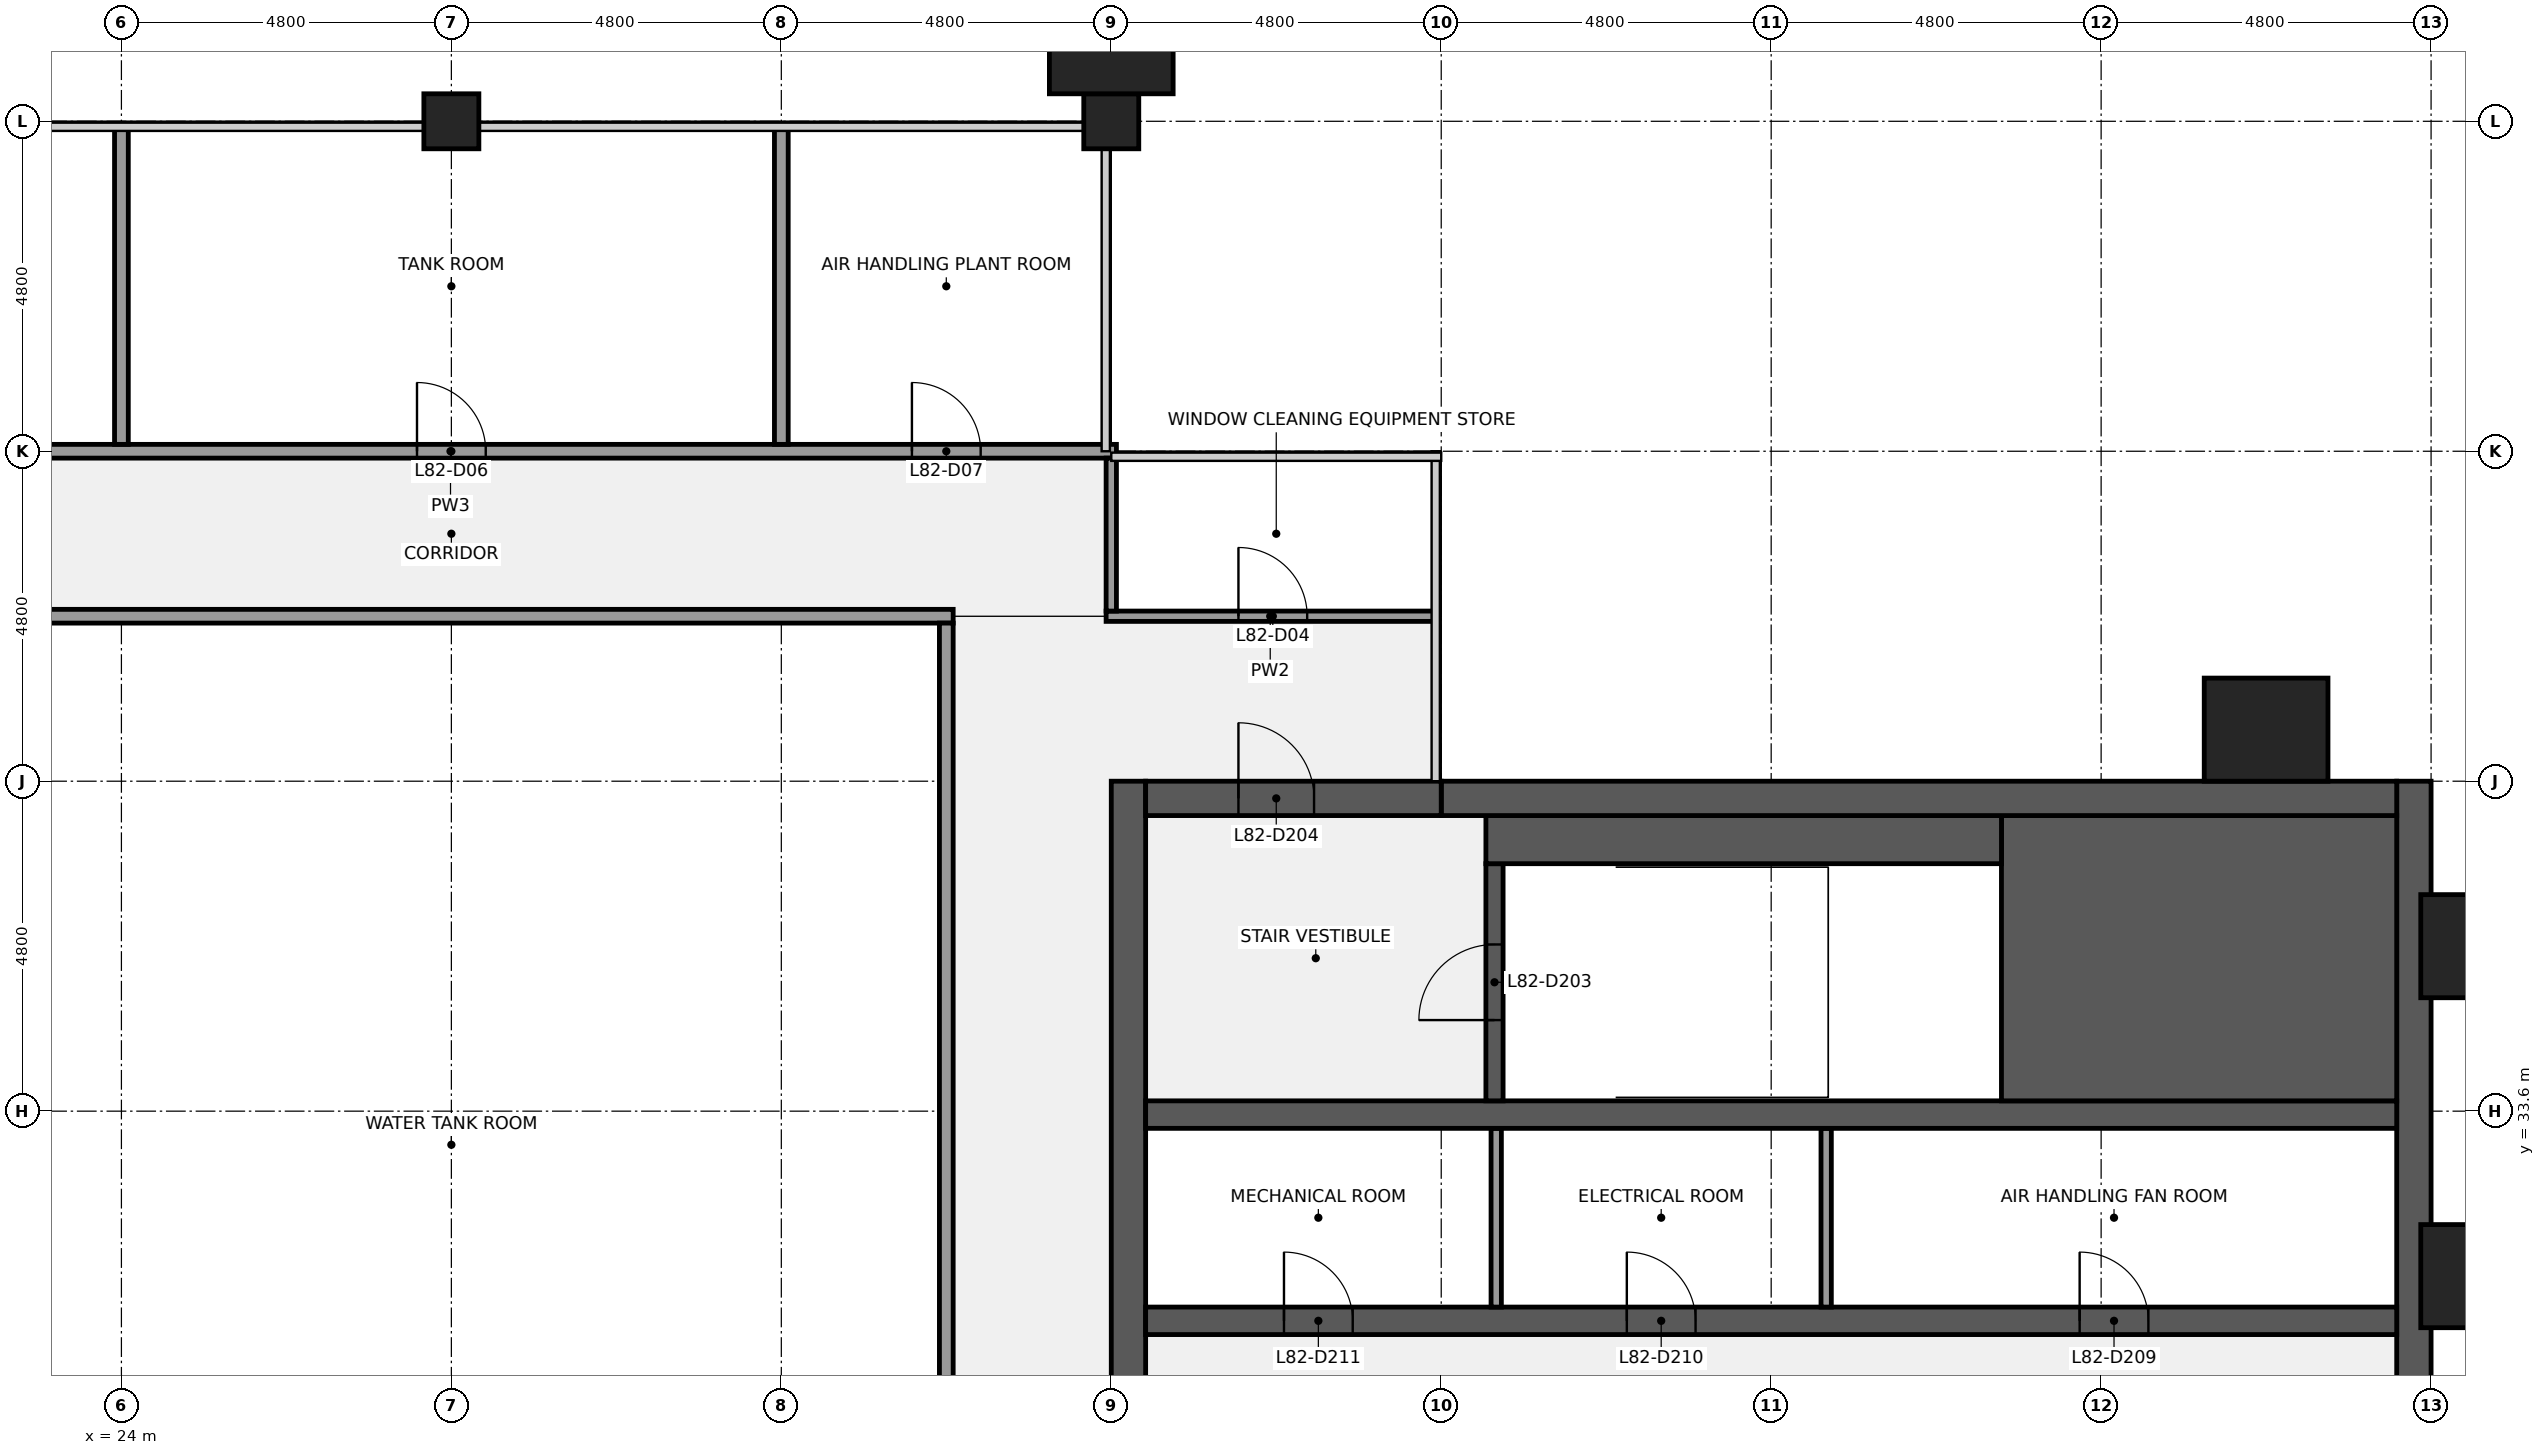
"""IFC4 building model, lengths in metres.
Left out: names, types, materials, properties, quantities, classifications, styles, units other than length and angle.
Written with IfcOpenShell. Run it as: python <this file> out.ifc"""

import sys

from ifc_helpers import new_model, si_unit, direction, frame, frame_2d, origin, origin_2d, place, context, subcontext, project, spatial, rectangle, extrude, element, fill, save


model = new_model("IFC4")
c1 = context("Model", 3, precision=1e-05, world=origin(), true_north=direction((0.0, 1.0)))
c2 = subcontext(c1, "Body", "Model", "MODEL_VIEW")
j1 = project(units=[si_unit("LENGTHUNIT", "METRE"), si_unit("PLANEANGLEUNIT", "RADIAN")], contexts=[c1])
p1 = place(None, origin())
s1 = spatial("IfcSite", under=j1, at=p1, CompositionType="ELEMENT")
p2 = place(p1, origin())
s2 = spatial("IfcBuilding", under=s1, at=p2, CompositionType="ELEMENT")
p3 = place(p2, frame((0.0, 0.0, 366.3)))
s3 = spatial("IfcBuildingStorey", under=s2, at=p3, CompositionType="ELEMENT", Elevation=366.3)
for number, where, z_axis, x_axis in (
    (1, (28.8, 48.0, 0.0), (0.0, 0.0, 1.0), (1.0, 0.0, 0.0)),
    (2, (38.4, 48.0, 0.0), (0.0, 0.0, 1.0), (1.0, 0.0, 0.0)),
):
    element("IfcColumn", number, at=place(p3, frame(where, z_axis=z_axis, x_axis=x_axis)), inside=s3, PredefinedType="COLUMN", context=c2, shape_type="SweptSolid", body=[
        extrude(rectangle(XDim=0.8, YDim=0.8, at=origin_2d()), origin(), (0.0, 0.0, 1.0), 4.0),
    ])
p4 = place(p3, frame((57.35, 38.4, 0.0), z_axis=(0.0, 0.0, 1.0), x_axis=(0.0, -1.0, 0.0)))
e3 = element("IfcWall", 3, at=p4, inside=s3, PredefinedType="SHEAR", context=c2, shape_type="SweptSolid", body=[
    extrude(rectangle(XDim=28.8, YDim=0.5, at=frame_2d((14.4, 0.0))), origin(), (0.0, 0.0, 1.0), 3.75),
])
p5 = place(p3, frame((38.65, 9.6, 0.0), z_axis=(0.0, 0.0, 1.0), x_axis=(0.0, 1.0, 0.0)))
e4 = element("IfcWall", 4, at=p5, inside=s3, PredefinedType="SHEAR", context=c2, shape_type="SweptSolid", body=[
    extrude(rectangle(XDim=28.8, YDim=0.5, at=frame_2d((14.4, 0.0))), origin(), (0.0, 0.0, 1.0), 3.75),
])
p6 = place(p5, frame((8.7, 0.0, 0.0)))
e5 = element("IfcOpeningElement", 5, at=p6, cuts=e4, PredefinedType="OPENING", context=c2, shape_type="SweptSolid", body=[
    extrude(rectangle(XDim=1.8, YDim=2.1, at=frame_2d((0.9, 1.05))), frame((0.0, 0.26, 0.0), z_axis=(0.0, -1.0, 0.0), x_axis=(1.0, 0.0, 0.0)), (0.0, 0.0, 1.0), 0.52),
])
p7 = place(p5, frame((18.3, 0.0, 0.0)))
e6 = element("IfcOpeningElement", 6, at=p7, cuts=e4, PredefinedType="OPENING", context=c2, shape_type="SweptSolid", body=[
    extrude(rectangle(XDim=1.8, YDim=2.1, at=frame_2d((0.9, 1.05))), frame((0.0, 0.26, 0.0), z_axis=(0.0, -1.0, 0.0), x_axis=(1.0, 0.0, 0.0)), (0.0, 0.0, 1.0), 0.52),
])
p8 = place(p3, frame((38.9, 30.55, 0.0), z_axis=(0.0, 0.0, 1.0), x_axis=(1.0, 0.0, 0.0)))
e7 = element("IfcWall", 7, at=p8, inside=s3, PredefinedType="SHEAR", context=c2, shape_type="SweptSolid", body=[
    extrude(rectangle(XDim=18.2, YDim=0.4, at=frame_2d((9.1, 0.0))), origin(), (0.0, 0.0, 1.0), 3.75),
])
p9 = place(p8, frame((13.587, 0.0, 0.0)))
e8 = element("IfcOpeningElement", 8, at=p9, cuts=e7, PredefinedType="OPENING", context=c2, shape_type="SweptSolid", body=[
    extrude(rectangle(XDim=1.0, YDim=2.1, at=frame_2d((0.5, 1.05))), frame((0.0, 0.21, 0.0), z_axis=(0.0, -1.0, 0.0), x_axis=(1.0, 0.0, 0.0)), (0.0, 0.0, 1.0), 0.42),
])
p10 = place(p8, frame((7.0, 0.0, 0.0)))
e9 = element("IfcOpeningElement", 9, at=p10, cuts=e7, PredefinedType="OPENING", context=c2, shape_type="SweptSolid", body=[
    extrude(rectangle(XDim=1.0, YDim=2.1, at=frame_2d((0.5, 1.05))), frame((0.0, 0.21, 0.0), z_axis=(0.0, -1.0, 0.0), x_axis=(1.0, 0.0, 0.0)), (0.0, 0.0, 1.0), 0.42),
])
p11 = place(p8, frame((2.012, 0.0, 0.0)))
e10 = element("IfcOpeningElement", 10, at=p11, cuts=e7, PredefinedType="OPENING", context=c2, shape_type="SweptSolid", body=[
    extrude(rectangle(XDim=1.0, YDim=2.1, at=frame_2d((0.5, 1.05))), frame((0.0, 0.21, 0.0), z_axis=(0.0, -1.0, 0.0), x_axis=(1.0, 0.0, 0.0)), (0.0, 0.0, 1.0), 0.42),
])
for number, where, z_axis, x_axis in (
    (11, (48.8, 30.75, 0.0), (0.0, 0.0, 1.0), (0.0, 1.0, 0.0)),
    (12, (44.0, 30.75, 0.0), (0.0, 0.0, 1.0), (0.0, 1.0, 0.0)),
):
    element("IfcWall", number, at=place(p3, frame(where, z_axis=z_axis, x_axis=x_axis)), inside=s3, PredefinedType="PARTITIONING", context=c2, shape_type="SweptSolid", body=[
        extrude(rectangle(XDim=2.6, YDim=0.15, at=frame_2d((1.3, 0.0))), origin(), (0.0, 0.0, 1.0), 3.75),
    ])
p12 = place(p3, frame((38.9, 33.55, 0.0), z_axis=(0.0, 0.0, 1.0), x_axis=(1.0, 0.0, 0.0)))
e13 = element("IfcWall", 13, at=p12, inside=s3, PredefinedType="SHEAR", context=c2, shape_type="SweptSolid", body=[
    extrude(rectangle(XDim=18.2, YDim=0.4, at=frame_2d((9.1, 0.0))), origin(), (0.0, 0.0, 1.0), 3.75),
])
p13 = place(p3, frame((51.35, 35.825, 0.0), z_axis=(0.0, 0.0, 1.0), x_axis=(1.0, 0.0, 0.0)))
e14 = element("IfcWall", 14, at=p13, inside=s3, PredefinedType="SHEAR", context=c2, shape_type="SweptSolid", body=[
    extrude(rectangle(XDim=5.75, YDim=4.15, at=frame_2d((2.875, 0.0))), origin(), (0.0, 0.0, 1.0), 3.75),
])
p14 = place(p3, frame((43.975, 33.75, 0.0), z_axis=(0.0, 0.0, 1.0), x_axis=(0.0, 1.0, 0.0)))
e15 = element("IfcWall", 15, at=p14, inside=s3, PredefinedType="SHEAR", context=c2, shape_type="SweptSolid", body=[
    extrude(rectangle(XDim=3.45, YDim=0.25, at=frame_2d((1.725, 0.0))), origin(), (0.0, 0.0, 1.0), 3.75),
])
p15 = place(p14, frame((1.175, 0.0, 0.0)))
e16 = element("IfcOpeningElement", 16, at=p15, cuts=e15, PredefinedType="OPENING", context=c2, shape_type="SweptSolid", body=[
    extrude(rectangle(XDim=1.1, YDim=2.1, at=frame_2d((0.55, 1.05))), frame((0.0, 0.135, 0.0), z_axis=(0.0, -1.0, 0.0), x_axis=(1.0, 0.0, 0.0)), (0.0, 0.0, 1.0), 0.27),
])
p16 = place(p3, frame((43.85, 37.55, 0.0), z_axis=(0.0, 0.0, 1.0), x_axis=(1.0, 0.0, 0.0)))
e17 = element("IfcWall", 17, at=p16, inside=s3, PredefinedType="SHEAR", context=c2, shape_type="SweptSolid", body=[
    extrude(rectangle(XDim=7.5, YDim=0.7, at=frame_2d((3.75, 0.0))), origin(), (0.0, 0.0, 1.0), 3.75),
])
p17 = place(p3, frame((43.2, 38.15, 0.0), z_axis=(0.0, 0.0, 1.0), x_axis=(1.0, 0.0, 0.0)))
e18 = element("IfcWall", 18, at=p17, inside=s3, PredefinedType="SHEAR", context=c2, shape_type="SweptSolid", body=[
    extrude(rectangle(XDim=13.9, YDim=0.5, at=frame_2d((6.95, 0.0))), origin(), (0.0, 0.0, 1.0), 3.75),
])
p18 = place(p3, frame((38.9, 38.15, 0.0), z_axis=(0.0, 0.0, 1.0), x_axis=(1.0, 0.0, 0.0)))
e19 = element("IfcWall", 19, at=p18, inside=s3, PredefinedType="SHEAR", context=c2, shape_type="SweptSolid", body=[
    extrude(rectangle(XDim=4.3, YDim=0.5, at=frame_2d((2.15, 0.0))), origin(), (0.0, 0.0, 1.0), 3.75),
])
p19 = place(p18, frame((1.35, 0.0, 0.0)))
e20 = element("IfcOpeningElement", 20, at=p19, cuts=e19, PredefinedType="OPENING", context=c2, shape_type="SweptSolid", body=[
    extrude(rectangle(XDim=1.1, YDim=2.1, at=frame_2d((0.55, 1.05))), frame((0.0, 0.26, 0.0), z_axis=(0.0, -1.0, 0.0), x_axis=(1.0, 0.0, 0.0)), (0.0, 0.0, 1.0), 0.52),
])
p20 = place(p3, frame((38.325, 40.8, 0.0), z_axis=(0.0, 0.0, 1.0), x_axis=(1.0, 0.0, 0.0)))
e21 = element("IfcWall", 21, at=p20, inside=s3, PredefinedType="PARTITIONING", context=c2, shape_type="SweptSolid", body=[
    extrude(rectangle(XDim=4.775, YDim=0.15, at=frame_2d((2.388, 0.0))), origin(), (0.0, 0.0, 1.0), 2.759),
])
p21 = place(p20, frame((1.925, 0.0, 0.0)))
e22 = element("IfcOpeningElement", 22, at=p21, cuts=e21, PredefinedType="OPENING", context=c2, shape_type="SweptSolid", body=[
    extrude(rectangle(XDim=1.0, YDim=2.1, at=frame_2d((0.5, 1.05))), frame((0.0, 0.085, 0.0), z_axis=(0.0, -1.0, 0.0), x_axis=(1.0, 0.0, 0.0)), (0.0, 0.0, 1.0), 0.17),
])
p22 = place(p3, frame((21.5, 40.8, 0.0), z_axis=(0.0, 0.0, 1.0), x_axis=(1.0, 0.0, 0.0)))
e23 = element("IfcWall", 23, at=p22, inside=s3, PredefinedType="PARTITIONING", context=c2, shape_type="SweptSolid", body=[
    extrude(rectangle(XDim=14.6, YDim=0.2, at=frame_2d((7.3, 0.0))), origin(), (0.0, 0.0, 1.0), 2.759),
])
p23 = place(p3, frame((19.1, 43.2, 0.0), z_axis=(0.0, 0.0, 1.0), x_axis=(1.0, 0.0, 0.0)))
e24 = element("IfcWall", 24, at=p23, inside=s3, PredefinedType="PARTITIONING", context=c2, shape_type="SweptSolid", body=[
    extrude(rectangle(XDim=19.375, YDim=0.2, at=frame_2d((9.688, 0.0))), origin(), (0.0, 0.0, 1.0), 2.759),
])
p24 = place(p23, frame((2.0, 0.0, 0.0)))
e25 = element("IfcOpeningElement", 25, at=p24, cuts=e24, PredefinedType="OPENING", context=c2, shape_type="SweptSolid", body=[
    extrude(rectangle(XDim=1.0, YDim=2.1, at=frame_2d((0.5, 1.05))), frame((0.0, 0.11, 0.0), z_axis=(0.0, -1.0, 0.0), x_axis=(1.0, 0.0, 0.0)), (0.0, 0.0, 1.0), 0.22),
])
p25 = place(p23, frame((9.2, 0.0, 0.0)))
e26 = element("IfcOpeningElement", 26, at=p25, cuts=e24, PredefinedType="OPENING", context=c2, shape_type="SweptSolid", body=[
    extrude(rectangle(XDim=1.0, YDim=2.1, at=frame_2d((0.5, 1.05))), frame((0.0, 0.11, 0.0), z_axis=(0.0, -1.0, 0.0), x_axis=(1.0, 0.0, 0.0)), (0.0, 0.0, 1.0), 0.22),
])
p26 = place(p23, frame((16.4, 0.0, 0.0)))
e27 = element("IfcOpeningElement", 27, at=p26, cuts=e24, PredefinedType="OPENING", context=c2, shape_type="SweptSolid", body=[
    extrude(rectangle(XDim=1.0, YDim=2.1, at=frame_2d((0.5, 1.05))), frame((0.0, 0.11, 0.0), z_axis=(0.0, -1.0, 0.0), x_axis=(1.0, 0.0, 0.0)), (0.0, 0.0, 1.0), 0.22),
])
for number, where, z_axis, x_axis in (
    (28, (24.0, 43.3, 0.0), (0.0, 0.0, 1.0), (0.0, 1.0, 0.0)),
    (29, (33.6, 43.3, 0.0), (0.0, 0.0, 1.0), (0.0, 1.0, 0.0)),
):
    element("IfcWall", number, at=place(p3, frame(where, z_axis=z_axis, x_axis=x_axis)), inside=s3, PredefinedType="PARTITIONING", context=c2, shape_type="SweptSolid", body=[
        extrude(rectangle(XDim=4.6, YDim=0.2, at=frame_2d((2.3, 0.0))), origin(), (0.0, 0.0, 1.0), 2.759),
    ])
p27 = place(p3, frame((36.0, 25.522, 0.0), z_axis=(0.0, 0.0, 1.0), x_axis=(0.0, 1.0, 0.0)))
e30 = element("IfcWall", 30, at=p27, inside=s3, PredefinedType="PARTITIONING", context=c2, shape_type="SweptSolid", body=[
    extrude(rectangle(XDim=15.178, YDim=0.2, at=frame_2d((7.589, 0.0))), origin(), (0.0, 0.0, 1.0), 2.759),
])
p28 = place(p3, frame((38.4, 40.875, 0.0), z_axis=(0.0, 0.0, 1.0), x_axis=(0.0, 1.0, 0.0)))
e31 = element("IfcWall", 31, at=p28, inside=s3, PredefinedType="PARTITIONING", context=c2, shape_type="SweptSolid", body=[
    extrude(rectangle(XDim=2.225, YDim=0.15, at=frame_2d((1.113, 0.0))), origin(), (0.0, 0.0, 1.0), 2.759),
])
for number, where, z_axis, x_axis in (
    (32, (58.35, 31.2, 0.0), (0.0, 0.0, 1.0), (0.0, 1.0, 0.0)),
    (33, (58.35, 36.0, 0.0), (0.0, 0.0, 1.0), (0.0, 1.0, 0.0)),
    (34, (55.2, 39.15, 0.0), (0.0, 0.0, 1.0), (1.0, 0.0, 0.0)),
):
    element("IfcColumn", number, at=place(p3, frame(where, z_axis=z_axis, x_axis=x_axis)), inside=s3, PredefinedType="PILASTER", context=c2, shape_type="SweptSolid", body=[
        extrude(rectangle(XDim=1.8, YDim=1.5, at=origin_2d()), origin(), (0.0, 0.0, 1.0), 4.0),
    ])
p29 = place(p3, frame((38.4, 48.95, 0.0), z_axis=(0.0, 0.0, 1.0), x_axis=(1.0, 0.0, 0.0)))
e35 = element("IfcColumn", 35, at=p29, inside=s3, PredefinedType="PILASTER", context=c2, shape_type="SweptSolid", body=[
    extrude(rectangle(XDim=1.8, YDim=1.1, at=origin_2d()), origin(), (0.0, 0.0, 1.0), 4.0),
])
p30 = place(p15, origin())
e36 = element("IfcDoor", 36, at=p30, inside=s3, OperationType="SINGLE_SWING_LEFT", PredefinedType="DOOR", context=c2, shape_type="SweptSolid", body=[
    extrude(rectangle(XDim=1.1, YDim=2.1, at=frame_2d((0.55, 1.05))), frame((0.0, 0.025, 0.0), z_axis=(0.0, -1.0, 0.0), x_axis=(1.0, 0.0, 0.0)), (0.0, 0.0, 1.0), 0.05),
])
fill(e16, e36)
p31 = place(p19, origin())
e37 = element("IfcDoor", 37, at=p31, inside=s3, OperationType="SINGLE_SWING_LEFT", PredefinedType="DOOR", context=c2, shape_type="SweptSolid", body=[
    extrude(rectangle(XDim=1.1, YDim=2.1, at=frame_2d((0.55, 1.05))), frame((0.0, 0.025, 0.0), z_axis=(0.0, -1.0, 0.0), x_axis=(1.0, 0.0, 0.0)), (0.0, 0.0, 1.0), 0.05),
])
fill(e20, e37)
p32 = place(p9, origin())
e38 = element("IfcDoor", 38, at=p32, inside=s3, OperationType="SINGLE_SWING_LEFT", PredefinedType="DOOR", context=c2, shape_type="SweptSolid", body=[
    extrude(rectangle(XDim=1.0, YDim=2.1, at=frame_2d((0.5, 1.05))), frame((0.0, 0.025, 0.0), z_axis=(0.0, -1.0, 0.0), x_axis=(1.0, 0.0, 0.0)), (0.0, 0.0, 1.0), 0.05),
])
fill(e8, e38)
p33 = place(p10, origin())
e39 = element("IfcDoor", 39, at=p33, inside=s3, OperationType="SINGLE_SWING_LEFT", PredefinedType="DOOR", context=c2, shape_type="SweptSolid", body=[
    extrude(rectangle(XDim=1.0, YDim=2.1, at=frame_2d((0.5, 1.05))), frame((0.0, 0.025, 0.0), z_axis=(0.0, -1.0, 0.0), x_axis=(1.0, 0.0, 0.0)), (0.0, 0.0, 1.0), 0.05),
])
fill(e9, e39)
p34 = place(p11, origin())
e40 = element("IfcDoor", 40, at=p34, inside=s3, OperationType="SINGLE_SWING_LEFT", PredefinedType="DOOR", context=c2, shape_type="SweptSolid", body=[
    extrude(rectangle(XDim=1.0, YDim=2.1, at=frame_2d((0.5, 1.05))), frame((0.0, 0.025, 0.0), z_axis=(0.0, -1.0, 0.0), x_axis=(1.0, 0.0, 0.0)), (0.0, 0.0, 1.0), 0.05),
])
fill(e10, e40)
p35 = place(p21, origin())
e41 = element("IfcDoor", 41, at=p35, inside=s3, OperationType="SINGLE_SWING_LEFT", PredefinedType="DOOR", context=c2, shape_type="SweptSolid", body=[
    extrude(rectangle(XDim=1.0, YDim=2.1, at=frame_2d((0.5, 1.05))), frame((0.0, 0.025, 0.0), z_axis=(0.0, -1.0, 0.0), x_axis=(1.0, 0.0, 0.0)), (0.0, 0.0, 1.0), 0.05),
])
fill(e22, e41)
p36 = place(p25, origin())
e42 = element("IfcDoor", 42, at=p36, inside=s3, OperationType="SINGLE_SWING_LEFT", PredefinedType="DOOR", context=c2, shape_type="SweptSolid", body=[
    extrude(rectangle(XDim=1.0, YDim=2.1, at=frame_2d((0.5, 1.05))), frame((0.0, 0.025, 0.0), z_axis=(0.0, -1.0, 0.0), x_axis=(1.0, 0.0, 0.0)), (0.0, 0.0, 1.0), 0.05),
])
fill(e26, e42)
p37 = place(p26, origin())
e43 = element("IfcDoor", 43, at=p37, inside=s3, OperationType="SINGLE_SWING_LEFT", PredefinedType="DOOR", context=c2, shape_type="SweptSolid", body=[
    extrude(rectangle(XDim=1.0, YDim=2.1, at=frame_2d((0.5, 1.05))), frame((0.0, 0.025, 0.0), z_axis=(0.0, -1.0, 0.0), x_axis=(1.0, 0.0, 0.0)), (0.0, 0.0, 1.0), 0.05),
])
fill(e27, e43)
save(model, sys.argv[1])
